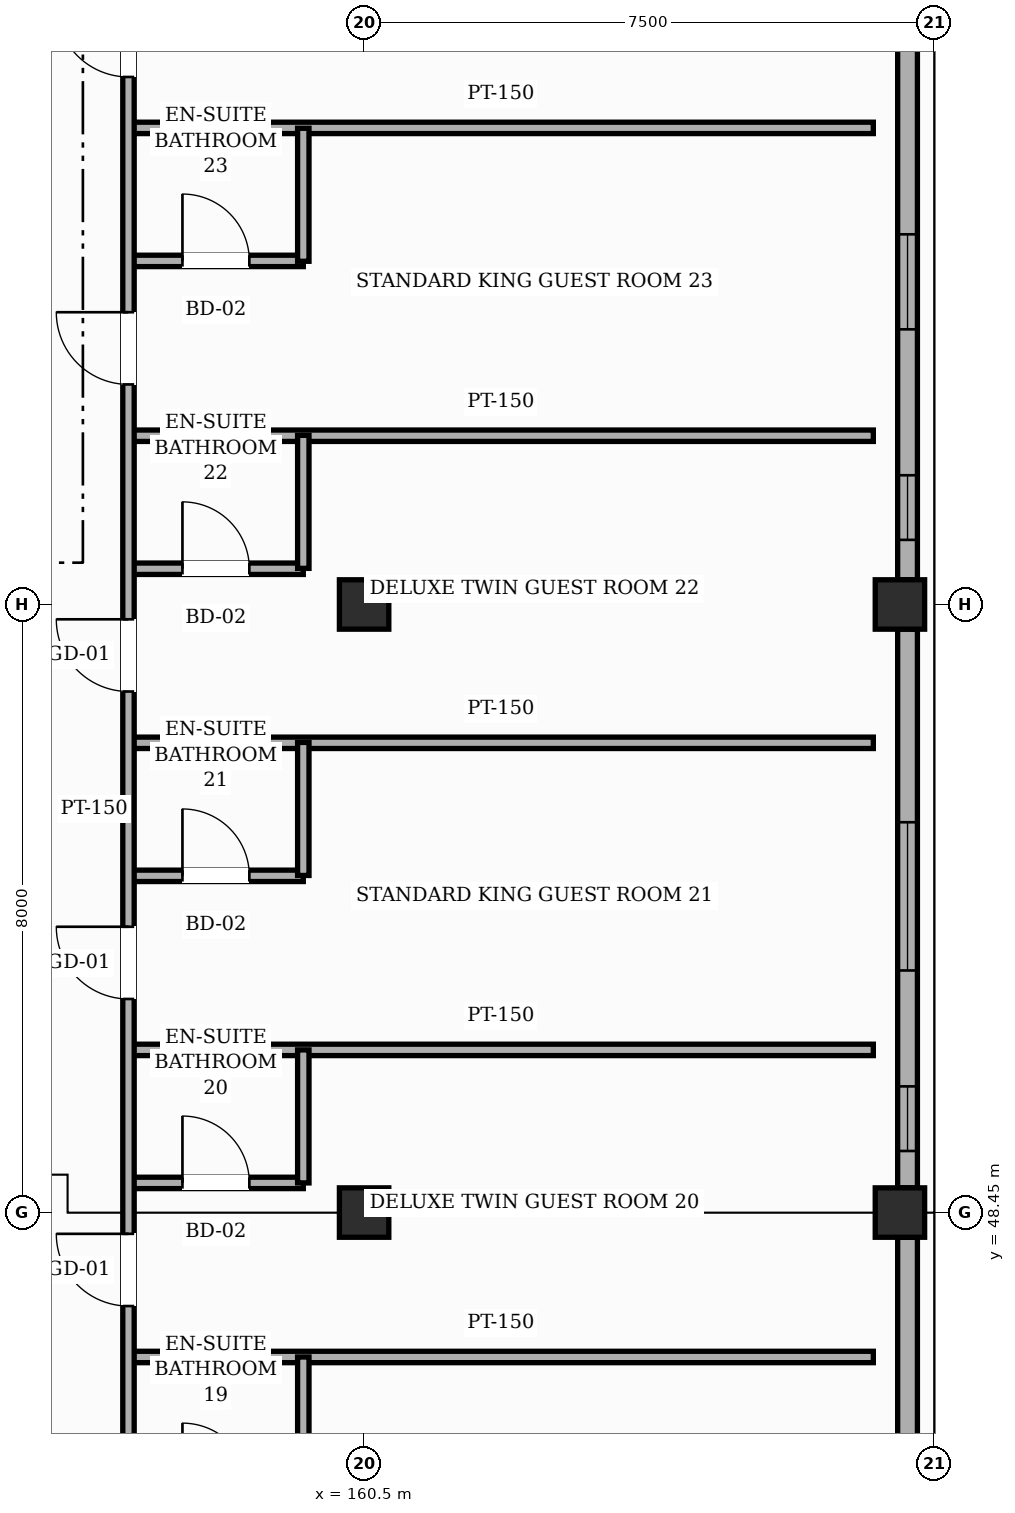
"""IFC4 building model, lengths in metres.
Left out: names, types, materials, properties, quantities, classifications, styles, units other than length and angle.
Written with IfcOpenShell. Run it as: python <this file> out.ifc"""

import sys

from ifc_helpers import new_model, si_unit, direction, frame, frame_2d, origin, origin_2d, place, context, subcontext, project, spatial, rectangle, hollow_rectangle, extrude, element, fill, save


model = new_model("IFC4")
c1 = context("Model", 3, precision=1e-05, world=origin(), true_north=direction((0.0, 1.0)))
c2 = subcontext(c1, "Body", "Model", "MODEL_VIEW")
j1 = project(units=[si_unit("LENGTHUNIT", "METRE"), si_unit("PLANEANGLEUNIT", "RADIAN")], contexts=[c1])
p1 = place(None, origin())
s1 = spatial("IfcSite", under=j1, at=p1, CompositionType="ELEMENT")
p2 = place(p1, origin())
s2 = spatial("IfcBuilding", under=s1, at=p2, CompositionType="ELEMENT")
p3 = place(p2, frame((0.0, 0.0, 15.0)))
s3 = spatial("IfcBuildingStorey", under=s2, at=p3, CompositionType="ELEMENT", Elevation=15.0)
for number, where, z_axis, x_axis in (
    (1, (160.5, 48.45, 0.0), (0.0, 0.0, 1.0), (1.0, 0.0, 0.0)),
    (2, (160.5, 56.45, 0.0), (0.0, 0.0, 1.0), (1.0, 0.0, 0.0)),
    (3, (167.55, 48.45, 0.0), (0.0, 0.0, 1.0), (1.0, 0.0, 0.0)),
    (4, (167.55, 56.45, 0.0), (0.0, 0.0, 1.0), (1.0, 0.0, 0.0)),
):
    element("IfcColumn", number, at=place(p3, frame(where, z_axis=z_axis, x_axis=x_axis)), inside=s3, PredefinedType="COLUMN", context=c2, shape_type="SweptSolid", body=[
        extrude(hollow_rectangle(XDim=0.65, YDim=0.65, WallThickness=0.025, InnerFilletRadius=0.025, OuterFilletRadius=0.05, at=origin_2d()), origin(), (0.0, 0.0, 1.0), 4.8),
    ])
p4 = place(p3, frame((167.65, 48.125, 0.0), z_axis=(0.0, 0.0, 1.0), x_axis=(0.0, -1.0, 0.0)))
e5 = element("IfcWall", 5, at=p4, inside=s3, PredefinedType="SOLIDWALL", context=c2, shape_type="SweptSolid", body=[
    extrude(rectangle(XDim=6.9, YDim=0.26, at=frame_2d((3.45, 0.0))), origin(), (0.0, 0.0, 1.0), 3.885),
])
p5 = place(p4, frame((2.82, 0.0, 0.85)))
e6 = element("IfcOpeningElement", 6, at=p5, cuts=e5, PredefinedType="OPENING", context=c2, shape_type="SweptSolid", body=[
    extrude(rectangle(XDim=1.55, YDim=1.35, at=frame_2d((0.775, 0.675))), frame((0.0, 0.14, 0.0), z_axis=(0.0, -1.0, 0.0), x_axis=(1.0, 0.0, 0.0)), (0.0, 0.0, 1.0), 0.28),
])
p6 = place(p3, frame((167.65, 56.125, 0.0), z_axis=(0.0, 0.0, 1.0), x_axis=(0.0, -1.0, 0.0)))
e7 = element("IfcWall", 7, at=p6, inside=s3, PredefinedType="SOLIDWALL", context=c2, shape_type="SweptSolid", body=[
    extrude(rectangle(XDim=7.35, YDim=0.26, at=frame_2d((3.675, 0.0))), origin(), (0.0, 0.0, 1.0), 3.885),
])
p7 = place(p6, frame((6.015, 0.0, 0.85)))
e8 = element("IfcOpeningElement", 8, at=p7, cuts=e7, PredefinedType="OPENING", context=c2, shape_type="SweptSolid", body=[
    extrude(rectangle(XDim=0.85, YDim=1.35, at=frame_2d((0.425, 0.675))), frame((0.0, 0.14, 0.0), z_axis=(0.0, -1.0, 0.0), x_axis=(1.0, 0.0, 0.0)), (0.0, 0.0, 1.0), 0.28),
])
p8 = place(p6, frame((2.54, 0.0, 0.85)))
e9 = element("IfcOpeningElement", 9, at=p8, cuts=e7, PredefinedType="OPENING", context=c2, shape_type="SweptSolid", body=[
    extrude(rectangle(XDim=1.95, YDim=1.35, at=frame_2d((0.975, 0.675))), frame((0.0, 0.14, 0.0), z_axis=(0.0, -1.0, 0.0), x_axis=(1.0, 0.0, 0.0)), (0.0, 0.0, 1.0), 0.28),
])
p9 = place(p3, frame((167.65, 64.125, 0.0), z_axis=(0.0, 0.0, 1.0), x_axis=(0.0, -1.0, 0.0)))
e10 = element("IfcWall", 10, at=p9, inside=s3, PredefinedType="SOLIDWALL", context=c2, shape_type="SweptSolid", body=[
    extrude(rectangle(XDim=7.35, YDim=0.26, at=frame_2d((3.675, 0.0))), origin(), (0.0, 0.0, 1.0), 3.885),
])
p10 = place(p9, frame((5.975, 0.0, 0.85)))
e11 = element("IfcOpeningElement", 11, at=p10, cuts=e10, PredefinedType="OPENING", context=c2, shape_type="SweptSolid", body=[
    extrude(rectangle(XDim=0.85, YDim=1.35, at=frame_2d((0.425, 0.675))), frame((0.0, 0.14, 0.0), z_axis=(0.0, -1.0, 0.0), x_axis=(1.0, 0.0, 0.0)), (0.0, 0.0, 1.0), 0.28),
])
p11 = place(p9, frame((2.805, 0.0, 0.85)))
e12 = element("IfcOpeningElement", 12, at=p11, cuts=e10, PredefinedType="OPENING", context=c2, shape_type="SweptSolid", body=[
    extrude(rectangle(XDim=1.25, YDim=1.5, at=frame_2d((0.625, 0.75))), frame((0.0, 0.14, 0.0), z_axis=(0.0, -1.0, 0.0), x_axis=(1.0, 0.0, 0.0)), (0.0, 0.0, 1.0), 0.28),
])
p12 = place(p3, frame((157.4, 46.55, 0.0), z_axis=(0.0, 0.0, 1.0), x_axis=(1.0, 0.0, 0.0)))
e13 = element("IfcWall", 13, at=p12, inside=s3, PredefinedType="PARTITIONING", context=c2, shape_type="SweptSolid", body=[
    extrude(rectangle(XDim=9.8, YDim=0.15, at=frame_2d((4.9, 0.0))), origin(), (0.0, 0.0, 1.0), 4.545),
])
p13 = place(p3, frame((157.4, 48.84, 0.0), z_axis=(0.0, 0.0, 1.0), x_axis=(1.0, 0.0, 0.0)))
e14 = element("IfcWall", 14, at=p13, inside=s3, PredefinedType="PARTITIONING", context=c2, shape_type="SweptSolid", body=[
    extrude(rectangle(XDim=2.3, YDim=0.15, at=frame_2d((1.15, 0.0))), origin(), (0.0, 0.0, 1.0), 4.545),
])
p14 = place(p13, frame((0.71, 0.0, 0.0)))
e15 = element("IfcOpeningElement", 15, at=p14, cuts=e14, PredefinedType="OPENING", context=c2, shape_type="SweptSolid", body=[
    extrude(rectangle(XDim=0.88, YDim=2.12, at=frame_2d((0.44, 1.06))), frame((0.0, 0.085, 0.0), z_axis=(0.0, -1.0, 0.0), x_axis=(1.0, 0.0, 0.0)), (0.0, 0.0, 1.0), 0.17),
])
p15 = place(p3, frame((157.4, 50.59, 0.0), z_axis=(0.0, 0.0, 1.0), x_axis=(1.0, 0.0, 0.0)))
e16 = element("IfcWall", 16, at=p15, inside=s3, PredefinedType="PARTITIONING", context=c2, shape_type="SweptSolid", body=[
    extrude(rectangle(XDim=9.8, YDim=0.15, at=frame_2d((4.9, 0.0))), origin(), (0.0, 0.0, 1.0), 4.545),
])
p16 = place(p3, frame((157.4, 52.88, 0.0), z_axis=(0.0, 0.0, 1.0), x_axis=(1.0, 0.0, 0.0)))
e17 = element("IfcWall", 17, at=p16, inside=s3, PredefinedType="PARTITIONING", context=c2, shape_type="SweptSolid", body=[
    extrude(rectangle(XDim=2.3, YDim=0.15, at=frame_2d((1.15, 0.0))), origin(), (0.0, 0.0, 1.0), 4.545),
])
p17 = place(p16, frame((0.71, 0.0, 0.0)))
e18 = element("IfcOpeningElement", 18, at=p17, cuts=e17, PredefinedType="OPENING", context=c2, shape_type="SweptSolid", body=[
    extrude(rectangle(XDim=0.88, YDim=2.12, at=frame_2d((0.44, 1.06))), frame((0.0, 0.085, 0.0), z_axis=(0.0, -1.0, 0.0), x_axis=(1.0, 0.0, 0.0)), (0.0, 0.0, 1.0), 0.17),
])
p18 = place(p3, frame((157.4, 54.63, 0.0), z_axis=(0.0, 0.0, 1.0), x_axis=(1.0, 0.0, 0.0)))
e19 = element("IfcWall", 19, at=p18, inside=s3, PredefinedType="PARTITIONING", context=c2, shape_type="SweptSolid", body=[
    extrude(rectangle(XDim=9.8, YDim=0.15, at=frame_2d((4.9, 0.0))), origin(), (0.0, 0.0, 1.0), 4.545),
])
p19 = place(p3, frame((157.4, 56.92, 0.0), z_axis=(0.0, 0.0, 1.0), x_axis=(1.0, 0.0, 0.0)))
e20 = element("IfcWall", 20, at=p19, inside=s3, PredefinedType="PARTITIONING", context=c2, shape_type="SweptSolid", body=[
    extrude(rectangle(XDim=2.3, YDim=0.15, at=frame_2d((1.15, 0.0))), origin(), (0.0, 0.0, 1.0), 4.545),
])
p20 = place(p19, frame((0.71, 0.0, 0.0)))
e21 = element("IfcOpeningElement", 21, at=p20, cuts=e20, PredefinedType="OPENING", context=c2, shape_type="SweptSolid", body=[
    extrude(rectangle(XDim=0.88, YDim=2.12, at=frame_2d((0.44, 1.06))), frame((0.0, 0.085, 0.0), z_axis=(0.0, -1.0, 0.0), x_axis=(1.0, 0.0, 0.0)), (0.0, 0.0, 1.0), 0.17),
])
p21 = place(p3, frame((157.4, 58.67, 0.0), z_axis=(0.0, 0.0, 1.0), x_axis=(1.0, 0.0, 0.0)))
e22 = element("IfcWall", 22, at=p21, inside=s3, PredefinedType="PARTITIONING", context=c2, shape_type="SweptSolid", body=[
    extrude(rectangle(XDim=9.8, YDim=0.15, at=frame_2d((4.9, 0.0))), origin(), (0.0, 0.0, 1.0), 4.545),
])
p22 = place(p3, frame((157.4, 60.97, 0.0), z_axis=(0.0, 0.0, 1.0), x_axis=(1.0, 0.0, 0.0)))
e23 = element("IfcWall", 23, at=p22, inside=s3, PredefinedType="PARTITIONING", context=c2, shape_type="SweptSolid", body=[
    extrude(rectangle(XDim=2.3, YDim=0.15, at=frame_2d((1.15, 0.0))), origin(), (0.0, 0.0, 1.0), 4.545),
])
p23 = place(p22, frame((0.71, 0.0, 0.0)))
e24 = element("IfcOpeningElement", 24, at=p23, cuts=e23, PredefinedType="OPENING", context=c2, shape_type="SweptSolid", body=[
    extrude(rectangle(XDim=0.88, YDim=2.12, at=frame_2d((0.44, 1.06))), frame((0.0, 0.085, 0.0), z_axis=(0.0, -1.0, 0.0), x_axis=(1.0, 0.0, 0.0)), (0.0, 0.0, 1.0), 0.17),
])
p24 = place(p3, frame((157.4, 62.72, 0.0), z_axis=(0.0, 0.0, 1.0), x_axis=(1.0, 0.0, 0.0)))
e25 = element("IfcWall", 25, at=p24, inside=s3, PredefinedType="PARTITIONING", context=c2, shape_type="SweptSolid", body=[
    extrude(rectangle(XDim=9.8, YDim=0.15, at=frame_2d((4.9, 0.0))), origin(), (0.0, 0.0, 1.0), 4.545),
])
p25 = place(p3, frame((157.4, 22.3, 0.0), z_axis=(0.0, 0.0, 1.0), x_axis=(0.0, 1.0, 0.0)))
e26 = element("IfcWall", 26, at=p25, inside=s3, PredefinedType="PARTITIONING", context=c2, shape_type="SweptSolid", body=[
    extrude(rectangle(XDim=48.5, YDim=0.15, at=frame_2d((24.25, 0.0))), origin(), (0.0, 0.0, 1.0), 4.545),
])
p26 = place(p25, frame((0.67, 0.0, 0.0)))
e27 = element("IfcOpeningElement", 27, at=p26, cuts=e26, PredefinedType="OPENING", context=c2, shape_type="SweptSolid", body=[
    extrude(rectangle(XDim=0.95, YDim=2.15, at=frame_2d((0.475, 1.075))), frame((0.0, 0.085, 0.0), z_axis=(0.0, -1.0, 0.0), x_axis=(1.0, 0.0, 0.0)), (0.0, 0.0, 1.0), 0.17),
])
p27 = place(p25, frame((4.71, 0.0, 0.0)))
e28 = element("IfcOpeningElement", 28, at=p27, cuts=e26, PredefinedType="OPENING", context=c2, shape_type="SweptSolid", body=[
    extrude(rectangle(XDim=0.95, YDim=2.15, at=frame_2d((0.475, 1.075))), frame((0.0, 0.085, 0.0), z_axis=(0.0, -1.0, 0.0), x_axis=(1.0, 0.0, 0.0)), (0.0, 0.0, 1.0), 0.17),
])
p28 = place(p25, frame((8.755, 0.0, 0.0)))
e29 = element("IfcOpeningElement", 29, at=p28, cuts=e26, PredefinedType="OPENING", context=c2, shape_type="SweptSolid", body=[
    extrude(rectangle(XDim=0.95, YDim=2.15, at=frame_2d((0.475, 1.075))), frame((0.0, 0.085, 0.0), z_axis=(0.0, -1.0, 0.0), x_axis=(1.0, 0.0, 0.0)), (0.0, 0.0, 1.0), 0.17),
])
p29 = place(p25, frame((12.795, 0.0, 0.0)))
e30 = element("IfcOpeningElement", 30, at=p29, cuts=e26, PredefinedType="OPENING", context=c2, shape_type="SweptSolid", body=[
    extrude(rectangle(XDim=0.95, YDim=2.15, at=frame_2d((0.475, 1.075))), frame((0.0, 0.085, 0.0), z_axis=(0.0, -1.0, 0.0), x_axis=(1.0, 0.0, 0.0)), (0.0, 0.0, 1.0), 0.17),
])
p30 = place(p25, frame((16.835, 0.0, 0.0)))
e31 = element("IfcOpeningElement", 31, at=p30, cuts=e26, PredefinedType="OPENING", context=c2, shape_type="SweptSolid", body=[
    extrude(rectangle(XDim=0.95, YDim=2.15, at=frame_2d((0.475, 1.075))), frame((0.0, 0.085, 0.0), z_axis=(0.0, -1.0, 0.0), x_axis=(1.0, 0.0, 0.0)), (0.0, 0.0, 1.0), 0.17),
])
p31 = place(p25, frame((20.88, 0.0, 0.0)))
e32 = element("IfcOpeningElement", 32, at=p31, cuts=e26, PredefinedType="OPENING", context=c2, shape_type="SweptSolid", body=[
    extrude(rectangle(XDim=0.95, YDim=2.15, at=frame_2d((0.475, 1.075))), frame((0.0, 0.085, 0.0), z_axis=(0.0, -1.0, 0.0), x_axis=(1.0, 0.0, 0.0)), (0.0, 0.0, 1.0), 0.17),
])
p32 = place(p25, frame((24.92, 0.0, 0.0)))
e33 = element("IfcOpeningElement", 33, at=p32, cuts=e26, PredefinedType="OPENING", context=c2, shape_type="SweptSolid", body=[
    extrude(rectangle(XDim=0.95, YDim=2.15, at=frame_2d((0.475, 1.075))), frame((0.0, 0.085, 0.0), z_axis=(0.0, -1.0, 0.0), x_axis=(1.0, 0.0, 0.0)), (0.0, 0.0, 1.0), 0.17),
])
p33 = place(p25, frame((28.96, 0.0, 0.0)))
e34 = element("IfcOpeningElement", 34, at=p33, cuts=e26, PredefinedType="OPENING", context=c2, shape_type="SweptSolid", body=[
    extrude(rectangle(XDim=0.95, YDim=2.15, at=frame_2d((0.475, 1.075))), frame((0.0, 0.085, 0.0), z_axis=(0.0, -1.0, 0.0), x_axis=(1.0, 0.0, 0.0)), (0.0, 0.0, 1.0), 0.17),
])
p34 = place(p25, frame((33.005, 0.0, 0.0)))
e35 = element("IfcOpeningElement", 35, at=p34, cuts=e26, PredefinedType="OPENING", context=c2, shape_type="SweptSolid", body=[
    extrude(rectangle(XDim=0.95, YDim=2.15, at=frame_2d((0.475, 1.075))), frame((0.0, 0.085, 0.0), z_axis=(0.0, -1.0, 0.0), x_axis=(1.0, 0.0, 0.0)), (0.0, 0.0, 1.0), 0.17),
])
p35 = place(p25, frame((37.045, 0.0, 0.0)))
e36 = element("IfcOpeningElement", 36, at=p35, cuts=e26, PredefinedType="OPENING", context=c2, shape_type="SweptSolid", body=[
    extrude(rectangle(XDim=0.95, YDim=2.15, at=frame_2d((0.475, 1.075))), frame((0.0, 0.085, 0.0), z_axis=(0.0, -1.0, 0.0), x_axis=(1.0, 0.0, 0.0)), (0.0, 0.0, 1.0), 0.17),
])
p36 = place(p25, frame((41.09, 0.0, 0.0)))
e37 = element("IfcOpeningElement", 37, at=p36, cuts=e26, PredefinedType="OPENING", context=c2, shape_type="SweptSolid", body=[
    extrude(rectangle(XDim=0.95, YDim=2.15, at=frame_2d((0.475, 1.075))), frame((0.0, 0.085, 0.0), z_axis=(0.0, -1.0, 0.0), x_axis=(1.0, 0.0, 0.0)), (0.0, 0.0, 1.0), 0.17),
])
p37 = place(p25, frame((45.13, 0.0, 0.0)))
e38 = element("IfcOpeningElement", 38, at=p37, cuts=e26, PredefinedType="OPENING", context=c2, shape_type="SweptSolid", body=[
    extrude(rectangle(XDim=0.95, YDim=2.15, at=frame_2d((0.475, 1.075))), frame((0.0, 0.085, 0.0), z_axis=(0.0, -1.0, 0.0), x_axis=(1.0, 0.0, 0.0)), (0.0, 0.0, 1.0), 0.17),
])
for number, where, z_axis, x_axis in (
    (39, (159.7, 44.8, 0.0), (0.0, 0.0, 1.0), (0.0, 1.0, 0.0)),
    (40, (159.7, 48.84, 0.0), (0.0, 0.0, 1.0), (0.0, 1.0, 0.0)),
    (41, (159.7, 52.885, 0.0), (0.0, 0.0, 1.0), (0.0, 1.0, 0.0)),
    (42, (159.7, 56.925, 0.0), (0.0, 0.0, 1.0), (0.0, 1.0, 0.0)),
    (43, (159.7, 60.965, 0.0), (0.0, 0.0, 1.0), (0.0, 1.0, 0.0)),
):
    element("IfcWall", number, at=place(p3, frame(where, z_axis=z_axis, x_axis=x_axis)), inside=s3, PredefinedType="PARTITIONING", context=c2, shape_type="SweptSolid", body=[
        extrude(rectangle(XDim=1.75, YDim=0.15, at=frame_2d((0.875, 0.0))), origin(), (0.0, 0.0, 1.0), 4.545),
    ])
p38 = place(p7, origin())
e44 = element("IfcWindow", 44, at=p38, inside=s3, PartitioningType="SINGLE_PANEL", PredefinedType="WINDOW", context=c2, shape_type="SweptSolid", body=[
    extrude(rectangle(XDim=0.85, YDim=1.35, at=frame_2d((0.425, 0.675))), frame((0.0, 0.03, 0.0), z_axis=(0.0, -1.0, 0.0), x_axis=(1.0, 0.0, 0.0)), (0.0, 0.0, 1.0), 0.06),
])
fill(e8, e44)
p39 = place(p8, origin())
e45 = element("IfcWindow", 45, at=p39, inside=s3, PartitioningType="SINGLE_PANEL", PredefinedType="WINDOW", context=c2, shape_type="SweptSolid", body=[
    extrude(rectangle(XDim=1.95, YDim=1.35, at=frame_2d((0.975, 0.675))), frame((0.0, 0.03, 0.0), z_axis=(0.0, -1.0, 0.0), x_axis=(1.0, 0.0, 0.0)), (0.0, 0.0, 1.0), 0.06),
])
fill(e9, e45)
p40 = place(p10, origin())
e46 = element("IfcWindow", 46, at=p40, inside=s3, PartitioningType="SINGLE_PANEL", PredefinedType="WINDOW", context=c2, shape_type="SweptSolid", body=[
    extrude(rectangle(XDim=0.85, YDim=1.35, at=frame_2d((0.425, 0.675))), frame((0.0, 0.03, 0.0), z_axis=(0.0, -1.0, 0.0), x_axis=(1.0, 0.0, 0.0)), (0.0, 0.0, 1.0), 0.06),
])
fill(e11, e46)
p41 = place(p11, origin())
e47 = element("IfcWindow", 47, at=p41, inside=s3, PartitioningType="SINGLE_PANEL", PredefinedType="WINDOW", context=c2, shape_type="SweptSolid", body=[
    extrude(rectangle(XDim=1.25, YDim=1.5, at=frame_2d((0.625, 0.75))), frame((0.0, 0.03, 0.0), z_axis=(0.0, -1.0, 0.0), x_axis=(1.0, 0.0, 0.0)), (0.0, 0.0, 1.0), 0.06),
])
fill(e12, e47)
p42 = place(p32, origin())
e48 = element("IfcDoor", 48, at=p42, inside=s3, OperationType="SINGLE_SWING_RIGHT", PredefinedType="DOOR", context=c2, shape_type="SweptSolid", body=[
    extrude(rectangle(XDim=0.95, YDim=2.15, at=frame_2d((0.475, 1.075))), frame((0.0, 0.025, 0.0), z_axis=(0.0, -1.0, 0.0), x_axis=(1.0, 0.0, 0.0)), (0.0, 0.0, 1.0), 0.05),
])
fill(e33, e48)
p43 = place(p14, origin())
e49 = element("IfcDoor", 49, at=p43, inside=s3, OperationType="SINGLE_SWING_LEFT", PredefinedType="DOOR", context=c2, shape_type="SweptSolid", body=[
    extrude(rectangle(XDim=0.88, YDim=2.12, at=frame_2d((0.44, 1.06))), frame((0.0, 0.025, 0.0), z_axis=(0.0, -1.0, 0.0), x_axis=(1.0, 0.0, 0.0)), (0.0, 0.0, 1.0), 0.05),
])
fill(e15, e49)
p44 = place(p33, origin())
e50 = element("IfcDoor", 50, at=p44, inside=s3, OperationType="SINGLE_SWING_RIGHT", PredefinedType="DOOR", context=c2, shape_type="SweptSolid", body=[
    extrude(rectangle(XDim=0.95, YDim=2.15, at=frame_2d((0.475, 1.075))), frame((0.0, 0.025, 0.0), z_axis=(0.0, -1.0, 0.0), x_axis=(1.0, 0.0, 0.0)), (0.0, 0.0, 1.0), 0.05),
])
fill(e34, e50)
p45 = place(p17, origin())
e51 = element("IfcDoor", 51, at=p45, inside=s3, OperationType="SINGLE_SWING_LEFT", PredefinedType="DOOR", context=c2, shape_type="SweptSolid", body=[
    extrude(rectangle(XDim=0.88, YDim=2.12, at=frame_2d((0.44, 1.06))), frame((0.0, 0.025, 0.0), z_axis=(0.0, -1.0, 0.0), x_axis=(1.0, 0.0, 0.0)), (0.0, 0.0, 1.0), 0.05),
])
fill(e18, e51)
p46 = place(p34, origin())
e52 = element("IfcDoor", 52, at=p46, inside=s3, OperationType="SINGLE_SWING_RIGHT", PredefinedType="DOOR", context=c2, shape_type="SweptSolid", body=[
    extrude(rectangle(XDim=0.95, YDim=2.15, at=frame_2d((0.475, 1.075))), frame((0.0, 0.025, 0.0), z_axis=(0.0, -1.0, 0.0), x_axis=(1.0, 0.0, 0.0)), (0.0, 0.0, 1.0), 0.05),
])
fill(e35, e52)
p47 = place(p20, origin())
e53 = element("IfcDoor", 53, at=p47, inside=s3, OperationType="SINGLE_SWING_LEFT", PredefinedType="DOOR", context=c2, shape_type="SweptSolid", body=[
    extrude(rectangle(XDim=0.88, YDim=2.12, at=frame_2d((0.44, 1.06))), frame((0.0, 0.025, 0.0), z_axis=(0.0, -1.0, 0.0), x_axis=(1.0, 0.0, 0.0)), (0.0, 0.0, 1.0), 0.05),
])
fill(e21, e53)
p48 = place(p35, origin())
e54 = element("IfcDoor", 54, at=p48, inside=s3, OperationType="SINGLE_SWING_RIGHT", PredefinedType="DOOR", context=c2, shape_type="SweptSolid", body=[
    extrude(rectangle(XDim=0.95, YDim=2.15, at=frame_2d((0.475, 1.075))), frame((0.0, 0.025, 0.0), z_axis=(0.0, -1.0, 0.0), x_axis=(1.0, 0.0, 0.0)), (0.0, 0.0, 1.0), 0.05),
])
fill(e36, e54)
p49 = place(p23, origin())
e55 = element("IfcDoor", 55, at=p49, inside=s3, OperationType="SINGLE_SWING_LEFT", PredefinedType="DOOR", context=c2, shape_type="SweptSolid", body=[
    extrude(rectangle(XDim=0.88, YDim=2.12, at=frame_2d((0.44, 1.06))), frame((0.0, 0.025, 0.0), z_axis=(0.0, -1.0, 0.0), x_axis=(1.0, 0.0, 0.0)), (0.0, 0.0, 1.0), 0.05),
])
fill(e24, e55)
p50 = place(p36, origin())
e56 = element("IfcDoor", 56, at=p50, inside=s3, OperationType="SINGLE_SWING_RIGHT", PredefinedType="DOOR", context=c2, shape_type="SweptSolid", body=[
    extrude(rectangle(XDim=0.95, YDim=2.15, at=frame_2d((0.475, 1.075))), frame((0.0, 0.025, 0.0), z_axis=(0.0, -1.0, 0.0), x_axis=(1.0, 0.0, 0.0)), (0.0, 0.0, 1.0), 0.05),
])
fill(e37, e56)
save(model, sys.argv[1])
